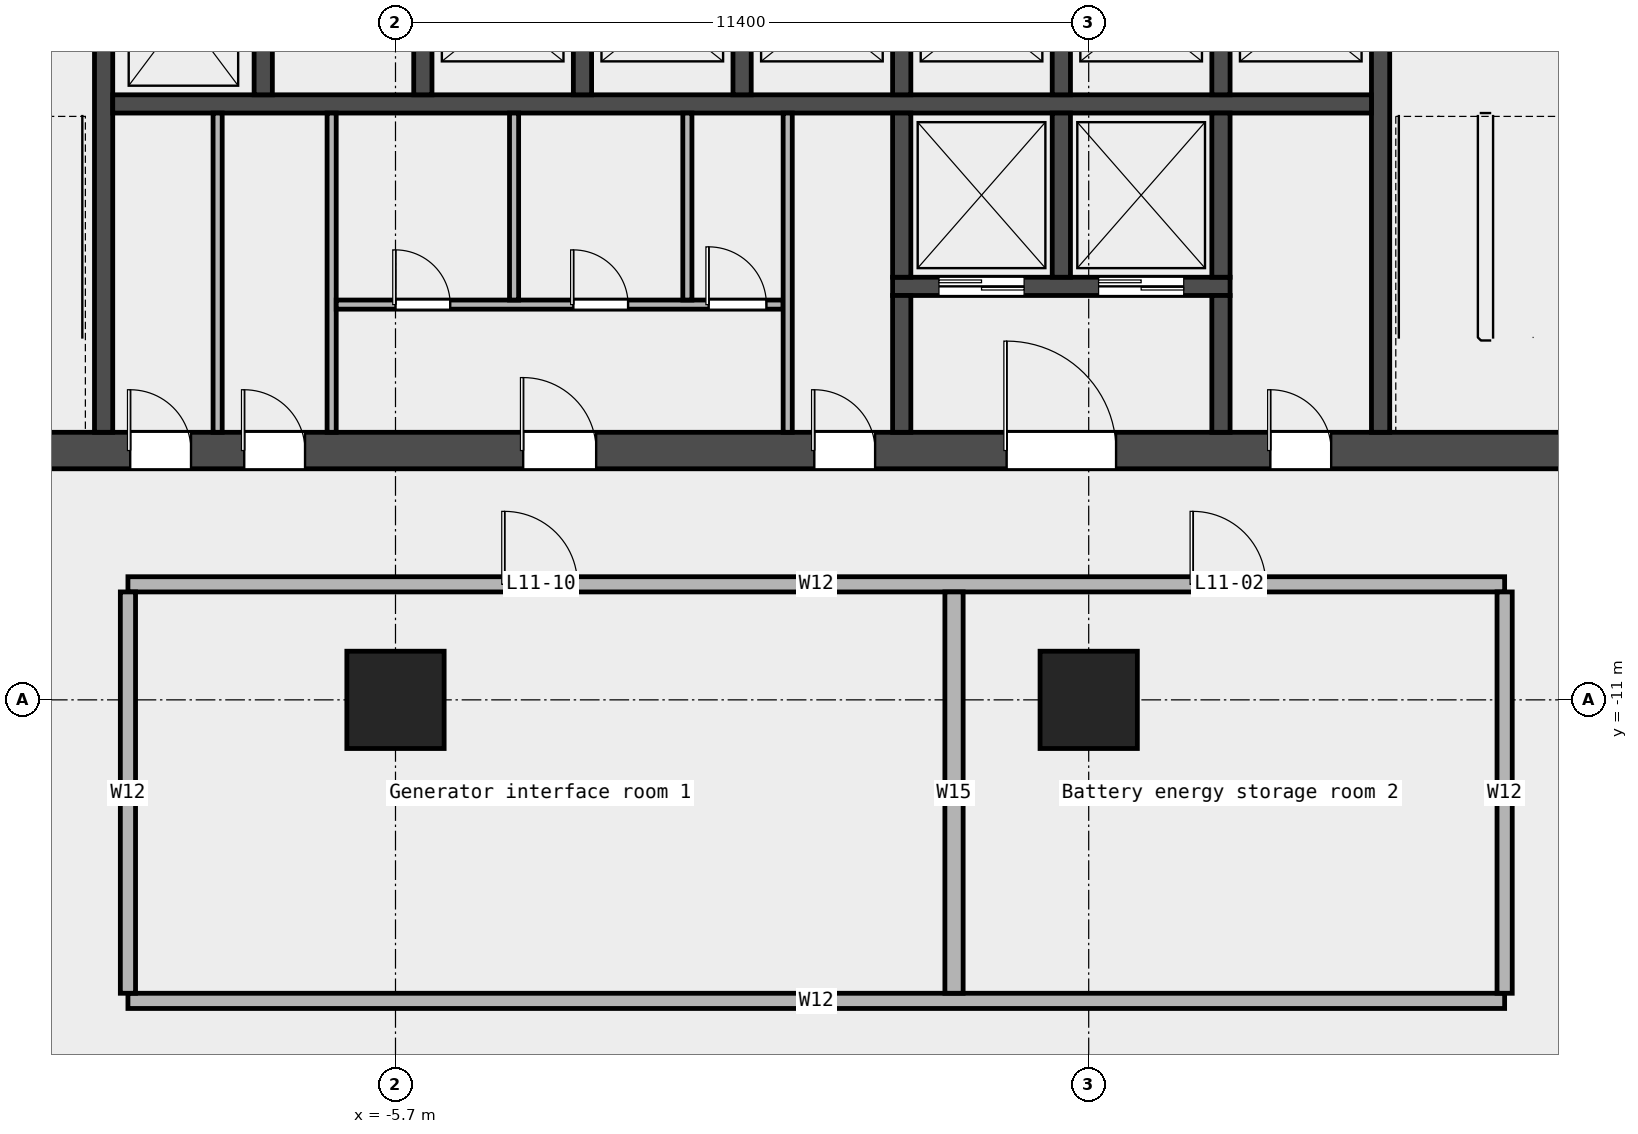
"""IFC4 building model, lengths in metres.
Left out: names, types, materials, properties, quantities, classifications, styles, units other than length and angle.
Written with IfcOpenShell. Run it as: python <this file> out.ifc"""

import sys

from ifc_helpers import new_model, si_unit, direction, frame, frame_2d, origin, origin_2d, place, context, subcontext, project, spatial, rectangle, extrude, element, fill, save


model = new_model("IFC4")
c1 = context("Model", 3, precision=1e-05, world=origin(), true_north=direction((0.0, 1.0)))
c2 = subcontext(c1, "Body", "Model", "MODEL_VIEW")
j1 = project(units=[si_unit("LENGTHUNIT", "METRE"), si_unit("PLANEANGLEUNIT", "RADIAN")], contexts=[c1])
p1 = place(None, origin())
s1 = spatial("IfcSite", under=j1, at=p1, CompositionType="ELEMENT")
p2 = place(p1, origin())
s2 = spatial("IfcBuilding", under=s1, at=p2, CompositionType="ELEMENT")
p3 = place(p2, frame((0.0, 0.0, 59.8)))
s3 = spatial("IfcBuildingStorey", under=s2, at=p3, CompositionType="ELEMENT", Elevation=59.8)
for number, where, z_axis, x_axis in (
    (1, (-5.7, -11.0, 0.0), (0.0, 0.0, 1.0), (1.0, 0.0, 0.0)),
    (2, (5.7, -11.0, 0.0), (0.0, 0.0, 1.0), (1.0, 0.0, 0.0)),
):
    element("IfcColumn", number, at=place(p3, frame(where, z_axis=z_axis, x_axis=x_axis)), inside=s3, PredefinedType="COLUMN", context=c2, shape_type="SweptSolid", body=[
        extrude(rectangle(XDim=1.6, YDim=1.6, at=origin_2d()), origin(), (0.0, 0.0, 1.0), 4.35),
    ])
p4 = place(p3, frame((-10.1, -15.95, 0.0), z_axis=(0.0, 0.0, 1.0), x_axis=(1.0, 0.0, 0.0)))
e3 = element("IfcWall", 3, at=p4, inside=s3, PredefinedType="PARTITIONING", context=c2, shape_type="SweptSolid", body=[
    extrude(rectangle(XDim=22.64, YDim=0.25, at=frame_2d((11.32, 0.0))), origin(), (0.0, 0.0, 1.0), 4.35),
])
p5 = place(p3, frame((-10.1, -9.1, 0.0), z_axis=(0.0, 0.0, 1.0), x_axis=(1.0, 0.0, 0.0)))
e4 = element("IfcWall", 4, at=p5, inside=s3, PredefinedType="PARTITIONING", context=c2, shape_type="SweptSolid", body=[
    extrude(rectangle(XDim=22.64, YDim=0.25, at=frame_2d((11.32, 0.0))), origin(), (0.0, 0.0, 1.0), 4.35),
])
p6 = place(p5, frame((17.512, 0.0, 0.0)))
e5 = element("IfcOpeningElement", 5, at=p6, cuts=e4, PredefinedType="OPENING", context=c2, shape_type="SweptSolid", body=[
    extrude(rectangle(XDim=1.2, YDim=2.1, at=frame_2d((0.6, 1.05))), frame((0.0, 0.137, 0.0), z_axis=(0.0, -1.0, 0.0), x_axis=(1.0, 0.0, 0.0)), (0.0, 0.0, 1.0), 0.274),
])
p7 = place(p5, frame((6.192, 0.0, 0.0)))
e6 = element("IfcOpeningElement", 6, at=p7, cuts=e4, PredefinedType="OPENING", context=c2, shape_type="SweptSolid", body=[
    extrude(rectangle(XDim=1.2, YDim=2.1, at=frame_2d((0.6, 1.05))), frame((0.0, 0.137, 0.0), z_axis=(0.0, -1.0, 0.0), x_axis=(1.0, 0.0, 0.0)), (0.0, 0.0, 1.0), 0.274),
])
p8 = place(p3, frame((-10.1, -15.825, 0.0), z_axis=(0.0, 0.0, 1.0), x_axis=(0.0, 1.0, 0.0)))
e7 = element("IfcWall", 7, at=p8, inside=s3, PredefinedType="PARTITIONING", context=c2, shape_type="SweptSolid", body=[
    extrude(rectangle(XDim=6.6, YDim=0.25, at=frame_2d((3.3, 0.0))), origin(), (0.0, 0.0, 1.0), 4.35),
])
p9 = place(p3, frame((3.485, -15.825, 0.0), z_axis=(0.0, 0.0, 1.0), x_axis=(0.0, 1.0, 0.0)))
e8 = element("IfcWall", 8, at=p9, inside=s3, PredefinedType="PARTITIONING", context=c2, shape_type="SweptSolid", body=[
    extrude(rectangle(XDim=6.6, YDim=0.3, at=frame_2d((3.3, 0.0))), origin(), (0.0, 0.0, 1.0), 4.35),
])
p10 = place(p3, frame((12.54, -15.825, 0.0), z_axis=(0.0, 0.0, 1.0), x_axis=(0.0, 1.0, 0.0)))
e9 = element("IfcWall", 9, at=p10, inside=s3, PredefinedType="PARTITIONING", context=c2, shape_type="SweptSolid", body=[
    extrude(rectangle(XDim=6.6, YDim=0.25, at=frame_2d((3.3, 0.0))), origin(), (0.0, 0.0, 1.0), 4.35),
])
p11 = place(p3, frame((-14.4, -6.9, 0.0), z_axis=(0.0, 0.0, 1.0), x_axis=(1.0, 0.0, 0.0)))
e10 = element("IfcWall", 10, at=p11, inside=s3, PredefinedType="SHEAR", context=c2, shape_type="SweptSolid", body=[
    extrude(rectangle(XDim=28.8, YDim=0.6, at=frame_2d((14.4, 0.0))), origin(), (0.0, 0.0, 1.0), 4.5),
])
p12 = place(p11, frame((4.337, 0.0, 0.0)))
e11 = element("IfcOpeningElement", 11, at=p12, cuts=e10, PredefinedType="OPENING", context=c2, shape_type="SweptSolid", body=[
    extrude(rectangle(XDim=1.0, YDim=2.1, at=frame_2d((0.5, 1.05))), frame((0.0, 0.312, 0.0), z_axis=(0.0, -1.0, 0.0), x_axis=(1.0, 0.0, 0.0)), (0.0, 0.0, 1.0), 0.624),
])
p13 = place(p11, frame((6.212, 0.0, 0.0)))
e12 = element("IfcOpeningElement", 12, at=p13, cuts=e10, PredefinedType="OPENING", context=c2, shape_type="SweptSolid", body=[
    extrude(rectangle(XDim=1.0, YDim=2.1, at=frame_2d((0.5, 1.05))), frame((0.0, 0.312, 0.0), z_axis=(0.0, -1.0, 0.0), x_axis=(1.0, 0.0, 0.0)), (0.0, 0.0, 1.0), 0.624),
])
p14 = place(p11, frame((10.8, 0.0, 0.0)))
e13 = element("IfcOpeningElement", 13, at=p14, cuts=e10, PredefinedType="OPENING", context=c2, shape_type="SweptSolid", body=[
    extrude(rectangle(XDim=1.2, YDim=2.1, at=frame_2d((0.6, 1.05))), frame((0.0, 0.312, 0.0), z_axis=(0.0, -1.0, 0.0), x_axis=(1.0, 0.0, 0.0)), (0.0, 0.0, 1.0), 0.624),
])
p15 = place(p11, frame((15.587, 0.0, 0.0)))
e14 = element("IfcOpeningElement", 14, at=p15, cuts=e10, PredefinedType="OPENING", context=c2, shape_type="SweptSolid", body=[
    extrude(rectangle(XDim=1.0, YDim=2.1, at=frame_2d((0.5, 1.05))), frame((0.0, 0.312, 0.0), z_axis=(0.0, -1.0, 0.0), x_axis=(1.0, 0.0, 0.0)), (0.0, 0.0, 1.0), 0.624),
])
p16 = place(p11, frame((18.75, 0.0, 0.0)))
e15 = element("IfcOpeningElement", 15, at=p16, cuts=e10, PredefinedType="OPENING", context=c2, shape_type="SweptSolid", body=[
    extrude(rectangle(XDim=1.8, YDim=2.1, at=frame_2d((0.9, 1.05))), frame((0.0, 0.312, 0.0), z_axis=(0.0, -1.0, 0.0), x_axis=(1.0, 0.0, 0.0)), (0.0, 0.0, 1.0), 0.624),
])
p17 = place(p11, frame((23.087, 0.0, 0.0)))
e16 = element("IfcOpeningElement", 16, at=p17, cuts=e10, PredefinedType="OPENING", context=c2, shape_type="SweptSolid", body=[
    extrude(rectangle(XDim=1.0, YDim=2.1, at=frame_2d((0.5, 1.05))), frame((0.0, 0.312, 0.0), z_axis=(0.0, -1.0, 0.0), x_axis=(1.0, 0.0, 0.0)), (0.0, 0.0, 1.0), 0.624),
])
for number, where, z_axis, x_axis in (
    (17, (-10.5, -6.6, 0.0), (0.0, 0.0, 1.0), (0.0, 1.0, 0.0)),
    (18, (10.5, -6.6, 0.0), (0.0, 0.0, 1.0), (0.0, 1.0, 0.0)),
):
    element("IfcWall", number, at=place(p3, frame(where, z_axis=z_axis, x_axis=x_axis)), inside=s3, PredefinedType="SHEAR", context=c2, shape_type="SweptSolid", body=[
        extrude(rectangle(XDim=8.55, YDim=0.3, at=frame_2d((4.275, 0.0))), origin(), (0.0, 0.0, 1.0), 4.5),
    ])
p18 = place(p3, frame((-10.35, -1.2, 0.0), z_axis=(0.0, 0.0, 1.0), x_axis=(1.0, 0.0, 0.0)))
e19 = element("IfcWall", 19, at=p18, inside=s3, PredefinedType="SOLIDWALL", context=c2, shape_type="SweptSolid", body=[
    extrude(rectangle(XDim=20.7, YDim=0.3, at=frame_2d((10.35, 0.0))), origin(), (0.0, 0.0, 1.0), 4.5),
])
for number, where, z_axis, x_axis in (
    (20, (-7.875, -1.05, 0.0), (0.0, 0.0, 1.0), (0.0, 1.0, 0.0)),
    (21, (-5.25, -1.05, 0.0), (0.0, 0.0, 1.0), (0.0, 1.0, 0.0)),
    (22, (-2.625, -1.05, 0.0), (0.0, 0.0, 1.0), (0.0, 1.0, 0.0)),
    (23, (0.0, -1.05, 0.0), (0.0, 0.0, 1.0), (0.0, 1.0, 0.0)),
    (24, (2.625, -1.05, 0.0), (0.0, 0.0, 1.0), (0.0, 1.0, 0.0)),
    (25, (5.25, -1.05, 0.0), (0.0, 0.0, 1.0), (0.0, 1.0, 0.0)),
    (26, (7.875, -1.05, 0.0), (0.0, 0.0, 1.0), (0.0, 1.0, 0.0)),
):
    element("IfcWall", number, at=place(p3, frame(where, z_axis=z_axis, x_axis=x_axis)), inside=s3, PredefinedType="SOLIDWALL", context=c2, shape_type="SweptSolid", body=[
        extrude(rectangle(XDim=2.7, YDim=0.3, at=frame_2d((1.35, 0.0))), origin(), (0.0, 0.0, 1.0), 4.5),
    ])
p19 = place(p3, frame((2.475, -4.2, 0.0), z_axis=(0.0, 0.0, 1.0), x_axis=(1.0, 0.0, 0.0)))
e27 = element("IfcWall", 27, at=p19, inside=s3, PredefinedType="SOLIDWALL", context=c2, shape_type="SweptSolid", body=[
    extrude(rectangle(XDim=5.55, YDim=0.3, at=frame_2d((2.775, 0.0))), origin(), (0.0, 0.0, 1.0), 4.5),
])
p20 = place(p19, frame((0.762, 0.0, 0.0)))
e28 = element("IfcOpeningElement", 28, at=p20, cuts=e27, PredefinedType="OPENING", context=c2, shape_type="SweptSolid", body=[
    extrude(rectangle(XDim=1.4, YDim=2.1, at=frame_2d((0.7, 1.05))), frame((0.0, 0.162, 0.0), z_axis=(0.0, -1.0, 0.0), x_axis=(1.0, 0.0, 0.0)), (0.0, 0.0, 1.0), 0.324),
])
p21 = place(p19, frame((3.387, 0.0, 0.0)))
e29 = element("IfcOpeningElement", 29, at=p21, cuts=e27, PredefinedType="OPENING", context=c2, shape_type="SweptSolid", body=[
    extrude(rectangle(XDim=1.4, YDim=2.1, at=frame_2d((0.7, 1.05))), frame((0.0, 0.162, 0.0), z_axis=(0.0, -1.0, 0.0), x_axis=(1.0, 0.0, 0.0)), (0.0, 0.0, 1.0), 0.324),
])
p22 = place(p3, frame((2.625, -4.05, 0.0), z_axis=(0.0, 0.0, 1.0), x_axis=(0.0, 1.0, 0.0)))
e30 = element("IfcWall", 30, at=p22, inside=s3, PredefinedType="SOLIDWALL", context=c2, shape_type="SweptSolid", body=[
    extrude(rectangle(XDim=2.7, YDim=0.3, at=frame_2d((1.35, 0.0))), origin(), (0.0, 0.0, 1.0), 4.5),
])
p23 = place(p3, frame((2.625, -6.6, 0.0), z_axis=(0.0, 0.0, 1.0), x_axis=(0.0, 1.0, 0.0)))
e31 = element("IfcWall", 31, at=p23, inside=s3, PredefinedType="SOLIDWALL", context=c2, shape_type="SweptSolid", body=[
    extrude(rectangle(XDim=2.25, YDim=0.3, at=frame_2d((1.125, 0.0))), origin(), (0.0, 0.0, 1.0), 4.5),
])
for number, where, z_axis, x_axis in (
    (32, (5.25, -4.05, 0.0), (0.0, 0.0, 1.0), (0.0, 1.0, 0.0)),
    (33, (7.875, -4.05, 0.0), (0.0, 0.0, 1.0), (0.0, 1.0, 0.0)),
):
    element("IfcWall", number, at=place(p3, frame(where, z_axis=z_axis, x_axis=x_axis)), inside=s3, PredefinedType="SOLIDWALL", context=c2, shape_type="SweptSolid", body=[
        extrude(rectangle(XDim=2.7, YDim=0.3, at=frame_2d((1.35, 0.0))), origin(), (0.0, 0.0, 1.0), 4.5),
    ])
p24 = place(p3, frame((7.875, -6.6, 0.0), z_axis=(0.0, 0.0, 1.0), x_axis=(0.0, 1.0, 0.0)))
e34 = element("IfcWall", 34, at=p24, inside=s3, PredefinedType="SOLIDWALL", context=c2, shape_type="SweptSolid", body=[
    extrude(rectangle(XDim=2.25, YDim=0.3, at=frame_2d((1.125, 0.0))), origin(), (0.0, 0.0, 1.0), 4.5),
])
for number, where, z_axis, x_axis in (
    (35, (-8.625, -6.6, 0.0), (0.0, 0.0, 1.0), (0.0, 1.0, 0.0)),
    (36, (-6.75, -6.6, 0.0), (0.0, 0.0, 1.0), (0.0, 1.0, 0.0)),
):
    element("IfcWall", number, at=place(p3, frame(where, z_axis=z_axis, x_axis=x_axis)), inside=s3, PredefinedType="PARTITIONING", context=c2, shape_type="SweptSolid", body=[
        extrude(rectangle(XDim=5.25, YDim=0.15, at=frame_2d((2.625, 0.0))), origin(), (0.0, 0.0, 1.0), 4.5),
    ])
p25 = place(p3, frame((-6.675, -4.5, 0.0), z_axis=(0.0, 0.0, 1.0), x_axis=(1.0, 0.0, 0.0)))
e37 = element("IfcWall", 37, at=p25, inside=s3, PredefinedType="PARTITIONING", context=c2, shape_type="SweptSolid", body=[
    extrude(rectangle(XDim=7.35, YDim=0.15, at=frame_2d((3.675, 0.0))), origin(), (0.0, 0.0, 1.0), 4.5),
])
p26 = place(p25, frame((0.975, 0.0, 0.0)))
e38 = element("IfcOpeningElement", 38, at=p26, cuts=e37, PredefinedType="OPENING", context=c2, shape_type="SweptSolid", body=[
    extrude(rectangle(XDim=0.9, YDim=2.1, at=frame_2d((0.45, 1.05))), frame((0.0, 0.087, 0.0), z_axis=(0.0, -1.0, 0.0), x_axis=(1.0, 0.0, 0.0)), (0.0, 0.0, 1.0), 0.174),
])
p27 = place(p25, frame((3.9, 0.0, 0.0)))
e39 = element("IfcOpeningElement", 39, at=p27, cuts=e37, PredefinedType="OPENING", context=c2, shape_type="SweptSolid", body=[
    extrude(rectangle(XDim=0.9, YDim=2.1, at=frame_2d((0.45, 1.05))), frame((0.0, 0.087, 0.0), z_axis=(0.0, -1.0, 0.0), x_axis=(1.0, 0.0, 0.0)), (0.0, 0.0, 1.0), 0.174),
])
p28 = place(p25, frame((6.125, 0.0, 0.0)))
e40 = element("IfcOpeningElement", 40, at=p28, cuts=e37, PredefinedType="OPENING", context=c2, shape_type="SweptSolid", body=[
    extrude(rectangle(XDim=0.95, YDim=2.1, at=frame_2d((0.475, 1.05))), frame((0.0, 0.087, 0.0), z_axis=(0.0, -1.0, 0.0), x_axis=(1.0, 0.0, 0.0)), (0.0, 0.0, 1.0), 0.174),
])
for number, where, z_axis, x_axis in (
    (41, (-3.75, -4.425, 0.0), (0.0, 0.0, 1.0), (0.0, 1.0, 0.0)),
    (42, (-0.9, -4.425, 0.0), (0.0, 0.0, 1.0), (0.0, 1.0, 0.0)),
):
    element("IfcWall", number, at=place(p3, frame(where, z_axis=z_axis, x_axis=x_axis)), inside=s3, PredefinedType="PARTITIONING", context=c2, shape_type="SweptSolid", body=[
        extrude(rectangle(XDim=3.075, YDim=0.15, at=frame_2d((1.538, 0.0))), origin(), (0.0, 0.0, 1.0), 4.5),
    ])
p29 = place(p3, frame((0.75, -6.6, 0.0), z_axis=(0.0, 0.0, 1.0), x_axis=(0.0, 1.0, 0.0)))
e43 = element("IfcWall", 43, at=p29, inside=s3, PredefinedType="PARTITIONING", context=c2, shape_type="SweptSolid", body=[
    extrude(rectangle(XDim=5.25, YDim=0.15, at=frame_2d((2.625, 0.0))), origin(), (0.0, 0.0, 1.0), 4.5),
])
p30 = place(p6, origin())
e44 = element("IfcDoor", 44, at=p30, inside=s3, OperationType="SINGLE_SWING_LEFT", PredefinedType="DOOR", context=c2, shape_type="SweptSolid", body=[
    extrude(rectangle(XDim=1.2, YDim=2.1, at=frame_2d((0.6, 1.05))), frame((0.0, 0.025, 0.0), z_axis=(0.0, -1.0, 0.0), x_axis=(1.0, 0.0, 0.0)), (0.0, 0.0, 1.0), 0.05),
])
fill(e5, e44)
p31 = place(p7, origin())
e45 = element("IfcDoor", 45, at=p31, inside=s3, OperationType="SINGLE_SWING_LEFT", PredefinedType="DOOR", context=c2, shape_type="SweptSolid", body=[
    extrude(rectangle(XDim=1.2, YDim=2.1, at=frame_2d((0.6, 1.05))), frame((0.0, 0.025, 0.0), z_axis=(0.0, -1.0, 0.0), x_axis=(1.0, 0.0, 0.0)), (0.0, 0.0, 1.0), 0.05),
])
fill(e6, e45)
p32 = place(p20, origin())
e46 = element("IfcDoor", 46, at=p32, inside=s3, OperationType="DOUBLE_DOOR_SLIDING", PredefinedType="DOOR", context=c2, shape_type="SweptSolid", body=[
    extrude(rectangle(XDim=1.4, YDim=2.1, at=frame_2d((0.7, 1.05))), frame((0.0, 0.025, 0.0), z_axis=(0.0, -1.0, 0.0), x_axis=(1.0, 0.0, 0.0)), (0.0, 0.0, 1.0), 0.05),
])
fill(e28, e46)
p33 = place(p21, origin())
e47 = element("IfcDoor", 47, at=p33, inside=s3, OperationType="DOUBLE_DOOR_SLIDING", PredefinedType="DOOR", context=c2, shape_type="SweptSolid", body=[
    extrude(rectangle(XDim=1.4, YDim=2.1, at=frame_2d((0.7, 1.05))), frame((0.0, 0.025, 0.0), z_axis=(0.0, -1.0, 0.0), x_axis=(1.0, 0.0, 0.0)), (0.0, 0.0, 1.0), 0.05),
])
fill(e29, e47)
p34 = place(p12, origin())
e48 = element("IfcDoor", 48, at=p34, inside=s3, OperationType="SINGLE_SWING_LEFT", PredefinedType="DOOR", context=c2, shape_type="SweptSolid", body=[
    extrude(rectangle(XDim=1.0, YDim=2.1, at=frame_2d((0.5, 1.05))), frame((0.0, 0.025, 0.0), z_axis=(0.0, -1.0, 0.0), x_axis=(1.0, 0.0, 0.0)), (0.0, 0.0, 1.0), 0.05),
])
fill(e11, e48)
p35 = place(p13, origin())
e49 = element("IfcDoor", 49, at=p35, inside=s3, OperationType="SINGLE_SWING_LEFT", PredefinedType="DOOR", context=c2, shape_type="SweptSolid", body=[
    extrude(rectangle(XDim=1.0, YDim=2.1, at=frame_2d((0.5, 1.05))), frame((0.0, 0.025, 0.0), z_axis=(0.0, -1.0, 0.0), x_axis=(1.0, 0.0, 0.0)), (0.0, 0.0, 1.0), 0.05),
])
fill(e12, e49)
p36 = place(p14, origin())
e50 = element("IfcDoor", 50, at=p36, inside=s3, OperationType="SINGLE_SWING_LEFT", PredefinedType="DOOR", context=c2, shape_type="SweptSolid", body=[
    extrude(rectangle(XDim=1.2, YDim=2.1, at=frame_2d((0.6, 1.05))), frame((0.0, 0.025, 0.0), z_axis=(0.0, -1.0, 0.0), x_axis=(1.0, 0.0, 0.0)), (0.0, 0.0, 1.0), 0.05),
])
fill(e13, e50)
p37 = place(p26, origin())
e51 = element("IfcDoor", 51, at=p37, inside=s3, OperationType="SINGLE_SWING_LEFT", PredefinedType="DOOR", context=c2, shape_type="SweptSolid", body=[
    extrude(rectangle(XDim=0.9, YDim=2.1, at=frame_2d((0.45, 1.05))), frame((0.0, 0.025, 0.0), z_axis=(0.0, -1.0, 0.0), x_axis=(1.0, 0.0, 0.0)), (0.0, 0.0, 1.0), 0.05),
])
fill(e38, e51)
p38 = place(p27, origin())
e52 = element("IfcDoor", 52, at=p38, inside=s3, OperationType="SINGLE_SWING_LEFT", PredefinedType="DOOR", context=c2, shape_type="SweptSolid", body=[
    extrude(rectangle(XDim=0.9, YDim=2.1, at=frame_2d((0.45, 1.05))), frame((0.0, 0.025, 0.0), z_axis=(0.0, -1.0, 0.0), x_axis=(1.0, 0.0, 0.0)), (0.0, 0.0, 1.0), 0.05),
])
fill(e39, e52)
p39 = place(p28, origin())
e53 = element("IfcDoor", 53, at=p39, inside=s3, OperationType="SINGLE_SWING_LEFT", PredefinedType="DOOR", context=c2, shape_type="SweptSolid", body=[
    extrude(rectangle(XDim=0.95, YDim=2.1, at=frame_2d((0.475, 1.05))), frame((0.0, 0.025, 0.0), z_axis=(0.0, -1.0, 0.0), x_axis=(1.0, 0.0, 0.0)), (0.0, 0.0, 1.0), 0.05),
])
fill(e40, e53)
p40 = place(p15, origin())
e54 = element("IfcDoor", 54, at=p40, inside=s3, OperationType="SINGLE_SWING_LEFT", PredefinedType="DOOR", context=c2, shape_type="SweptSolid", body=[
    extrude(rectangle(XDim=1.0, YDim=2.1, at=frame_2d((0.5, 1.05))), frame((0.0, 0.025, 0.0), z_axis=(0.0, -1.0, 0.0), x_axis=(1.0, 0.0, 0.0)), (0.0, 0.0, 1.0), 0.05),
])
fill(e14, e54)
p41 = place(p16, origin())
e55 = element("IfcDoor", 55, at=p41, inside=s3, OperationType="DOUBLE_DOOR_SINGLE_SWING", PredefinedType="DOOR", context=c2, shape_type="SweptSolid", body=[
    extrude(rectangle(XDim=1.8, YDim=2.1, at=frame_2d((0.9, 1.05))), frame((0.0, 0.025, 0.0), z_axis=(0.0, -1.0, 0.0), x_axis=(1.0, 0.0, 0.0)), (0.0, 0.0, 1.0), 0.05),
])
fill(e15, e55)
p42 = place(p17, origin())
e56 = element("IfcDoor", 56, at=p42, inside=s3, OperationType="SINGLE_SWING_LEFT", PredefinedType="DOOR", context=c2, shape_type="SweptSolid", body=[
    extrude(rectangle(XDim=1.0, YDim=2.1, at=frame_2d((0.5, 1.05))), frame((0.0, 0.025, 0.0), z_axis=(0.0, -1.0, 0.0), x_axis=(1.0, 0.0, 0.0)), (0.0, 0.0, 1.0), 0.05),
])
fill(e16, e56)
save(model, sys.argv[1])
